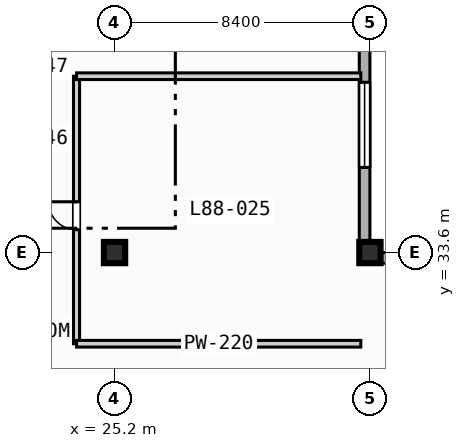
"""IFC4 building model, lengths in metres.
Left out: names, types, materials, properties, quantities, classifications, styles, units other than length and angle.
Written with IfcOpenShell. Run it as: python <this file> out.ifc"""

import sys

from ifc_helpers import new_model, si_unit, direction, frame, frame_2d, origin, origin_2d, place, context, subcontext, project, spatial, rectangle, extrude, element, fill, save


model = new_model("IFC4")
c1 = context("Model", 3, precision=1e-05, world=origin(), true_north=direction((0.0, 1.0)))
c2 = subcontext(c1, "Body", "Model", "MODEL_VIEW")
j1 = project(units=[si_unit("LENGTHUNIT", "METRE"), si_unit("PLANEANGLEUNIT", "RADIAN")], contexts=[c1])
p1 = place(None, origin())
s1 = spatial("IfcSite", under=j1, at=p1, CompositionType="ELEMENT")
p2 = place(p1, origin())
s2 = spatial("IfcBuilding", under=s1, at=p2, CompositionType="ELEMENT")
p3 = place(p2, frame((0.0, 0.0, 355.4)))
s3 = spatial("IfcBuildingStorey", under=s2, at=p3, CompositionType="ELEMENT", Elevation=355.4)
for number, where, z_axis, x_axis in (
    (1, (25.2, 33.6, 0.0), (0.0, 0.0, 1.0), (1.0, 0.0, 0.0)),
    (2, (33.6, 33.6, 0.0), (0.0, 0.0, 1.0), (1.0, 0.0, 0.0)),
):
    element("IfcColumn", number, at=place(p3, frame(where, z_axis=z_axis, x_axis=x_axis)), inside=s3, PredefinedType="COLUMN", context=c2, shape_type="SweptSolid", body=[
        extrude(rectangle(XDim=0.7, YDim=0.7, at=origin_2d()), origin(), (0.0, 0.0, 1.0), 4.2),
    ])
p4 = place(p3, frame((33.425, 72.425, 0.0), z_axis=(0.0, 0.0, 1.0), x_axis=(0.0, -1.0, 0.0)))
e3 = element("IfcWall", 3, at=p4, inside=s3, PredefinedType="STANDARD", context=c2, shape_type="SweptSolid", body=[
    extrude(rectangle(XDim=39.0, YDim=0.35, at=frame_2d((19.5, 0.0))), origin(), (0.0, 0.0, 1.0), 3.97),
])
p5 = place(p4, frame((33.225, 0.0, 0.85)))
e4 = element("IfcOpeningElement", 4, at=p5, cuts=e3, PredefinedType="OPENING", context=c2, shape_type="SweptSolid", body=[
    extrude(rectangle(XDim=2.8, YDim=2.1, at=frame_2d((1.4, 1.05))), frame((0.0, 0.185, 0.0), z_axis=(0.0, -1.0, 0.0), x_axis=(1.0, 0.0, 0.0)), (0.0, 0.0, 1.0), 0.37),
])
p6 = place(p4, frame((8.025, 0.0, 0.85)))
e5 = element("IfcOpeningElement", 5, at=p6, cuts=e3, PredefinedType="OPENING", context=c2, shape_type="SweptSolid", body=[
    extrude(rectangle(XDim=2.8, YDim=2.1, at=frame_2d((1.4, 1.05))), frame((0.0, 0.185, 0.0), z_axis=(0.0, -1.0, 0.0), x_axis=(1.0, 0.0, 0.0)), (0.0, 0.0, 1.0), 0.37),
])
p7 = place(p3, frame((33.425, 33.425, 0.0), z_axis=(0.0, 0.0, 1.0), x_axis=(1.0, 0.0, 0.0)))
e6 = element("IfcWall", 6, at=p7, inside=s3, PredefinedType="STANDARD", context=c2, shape_type="SweptSolid", body=[
    extrude(rectangle(XDim=30.6, YDim=0.35, at=frame_2d((15.3, 0.0))), origin(), (0.0, 0.0, 1.0), 3.97),
])
p8 = place(p7, frame((12.075, 0.0, 0.0)))
e7 = element("IfcOpeningElement", 7, at=p8, cuts=e6, PredefinedType="OPENING", context=c2, shape_type="SweptSolid", body=[
    extrude(rectangle(XDim=1.4, YDim=2.2, at=frame_2d((0.7, 1.1))), frame((0.0, 0.185, 0.0), z_axis=(0.0, -1.0, 0.0), x_axis=(1.0, 0.0, 0.0)), (0.0, 0.0, 1.0), 0.37),
])
p9 = place(p3, frame((23.95, 30.6, 0.0), z_axis=(0.0, 0.0, 1.0), x_axis=(0.0, 1.0, 0.0)))
e8 = element("IfcWall", 8, at=p9, inside=s3, PredefinedType="PARTITIONING", context=c2, shape_type="SweptSolid", body=[
    extrude(rectangle(XDim=8.8, YDim=0.2, at=frame_2d((4.4, 0.0))), origin(), (0.0, 0.0, 1.0), 3.97),
])
p10 = place(p9, frame((3.75, 0.0, 0.0)))
e9 = element("IfcOpeningElement", 9, at=p10, cuts=e8, PredefinedType="OPENING", context=c2, shape_type="SweptSolid", body=[
    extrude(rectangle(XDim=0.92, YDim=2.1, at=frame_2d((0.46, 1.05))), frame((0.0, 0.11, 0.0), z_axis=(0.0, -1.0, 0.0), x_axis=(1.0, 0.0, 0.0)), (0.0, 0.0, 1.0), 0.22),
])
for number, where, z_axis, x_axis in (
    (10, (23.95, 30.6, 0.0), (0.0, 0.0, 1.0), (1.0, 0.0, 0.0)),
    (11, (23.95, 39.4, 0.0), (0.0, 0.0, 1.0), (1.0, 0.0, 0.0)),
):
    element("IfcWall", number, at=place(p3, frame(where, z_axis=z_axis, x_axis=x_axis)), inside=s3, PredefinedType="PARTITIONING", context=c2, shape_type="SweptSolid", body=[
        extrude(rectangle(XDim=9.35, YDim=0.22, at=frame_2d((4.675, 0.0))), origin(), (0.0, 0.0, 1.0), 3.97),
    ])
p11 = place(p5, origin())
e12 = element("IfcWindow", 12, at=p11, inside=s3, PartitioningType="SINGLE_PANEL", PredefinedType="WINDOW", context=c2, shape_type="SweptSolid", body=[
    extrude(rectangle(XDim=2.8, YDim=2.1, at=frame_2d((1.4, 1.05))), frame((0.0, 0.03, 0.0), z_axis=(0.0, -1.0, 0.0), x_axis=(1.0, 0.0, 0.0)), (0.0, 0.0, 1.0), 0.06),
])
fill(e4, e12)
p12 = place(p10, origin())
e13 = element("IfcDoor", 13, at=p12, inside=s3, OperationType="SINGLE_SWING_RIGHT", PredefinedType="DOOR", context=c2, shape_type="SweptSolid", body=[
    extrude(rectangle(XDim=0.92, YDim=2.1, at=frame_2d((0.46, 1.05))), frame((0.0, 0.025, 0.0), z_axis=(0.0, -1.0, 0.0), x_axis=(1.0, 0.0, 0.0)), (0.0, 0.0, 1.0), 0.05),
])
fill(e9, e13)
save(model, sys.argv[1])
